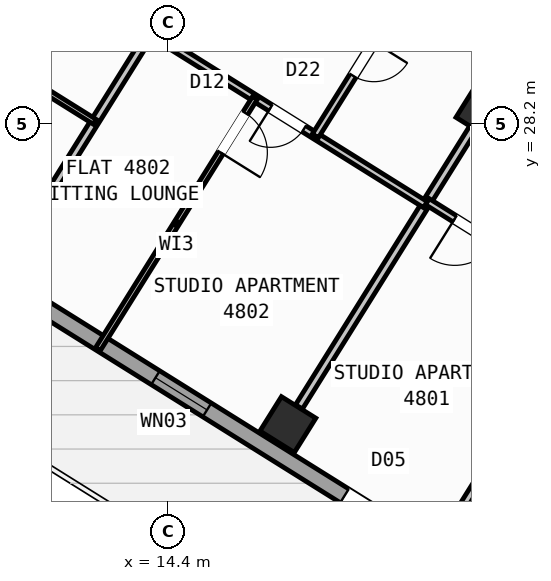
"""IFC4 building model, lengths in metres.
Left out: names, types, materials, properties, quantities, classifications, styles, units other than length and angle.
Written with IfcOpenShell. Run it as: python <this file> out.ifc"""

import sys

from ifc_helpers import new_model, si_unit, direction, frame, frame_2d, origin, origin_2d, place, context, subcontext, project, spatial, rectangle, hollow_rectangle, extrude, source, transform, mapped, element, fill, save


model = new_model("IFC4")
c1 = context("Model", 3, precision=1e-05, world=origin(), true_north=direction((0.0, 1.0)))
c2 = subcontext(c1, "Body", "Model", "MODEL_VIEW")
j1 = project(units=[si_unit("LENGTHUNIT", "METRE"), si_unit("PLANEANGLEUNIT", "RADIAN")], contexts=[c1])
p1 = place(None, origin())
s1 = spatial("IfcSite", under=j1, at=p1, CompositionType="ELEMENT")
p2 = place(p1, origin())
s2 = spatial("IfcBuilding", under=s1, at=p2, CompositionType="ELEMENT")
p3 = place(p2, frame((0.0, 0.0, 191.4)))
s3 = spatial("IfcBuildingStorey", under=s2, at=p3, CompositionType="ELEMENT", Elevation=191.4)
m1 = source(origin(), c2, "Body", "SweptSolid", [
    extrude(hollow_rectangle(XDim=0.8, YDim=0.8, WallThickness=0.032, at=origin_2d()), origin(), (0.0, 0.0, 1.0), 3.6),
])
for number, where, z_axis, x_axis in (
    (1, (20.632, 28.452, 0.0), (0.0, 0.0, 1.0), (-0.848, 0.53, 0.0)),
    (2, (16.764, 22.261, 0.0), (0.0, 0.0, 1.0), (-0.848, 0.53, 0.0)),
):
    element("IfcColumn", number, at=place(p3, frame(where, z_axis=z_axis, x_axis=x_axis)), inside=s3, PredefinedType="COLUMN", context=c2, shape_type="MappedRepresentation", body=[
        mapped(m1, transform((0.0, 0.0, 0.0), scale=1.0)),
    ])
p4 = place(p3, frame((31.76, 12.183, 0.0), z_axis=(0.0, 0.0, 1.0), x_axis=(-0.848047074256, 0.529920899612, 0.0)))
e3 = element("IfcWall", 3, at=p4, inside=s3, PredefinedType="STANDARD", context=c2, shape_type="SweptSolid", body=[
    extrude(rectangle(XDim=30.652, YDim=0.32, at=frame_2d((15.326, 0.0))), origin(), (0.0, 0.0, 1.0), 3.32),
])
p5 = place(p4, frame((15.166, 0.0, 0.0)))
e4 = element("IfcOpeningElement", 4, at=p5, cuts=e3, PredefinedType="OPENING", context=c2, shape_type="SweptSolid", body=[
    extrude(rectangle(XDim=1.2, YDim=2.15, at=frame_2d((0.6, 1.075))), frame((0.0, 0.17, 0.0), z_axis=(0.0, -1.0, 0.0), x_axis=(1.0, 0.0, 0.0)), (0.0, 0.0, 1.0), 0.34),
])
p6 = place(p4, frame((2.015, 0.0, 0.8)))
e5 = element("IfcOpeningElement", 5, at=p6, cuts=e3, PredefinedType="OPENING", context=c2, shape_type="SweptSolid", body=[
    extrude(rectangle(XDim=2.1, YDim=1.55, at=frame_2d((1.05, 0.775))), frame((0.0, 0.17, 0.0), z_axis=(0.0, -1.0, 0.0), x_axis=(1.0, 0.0, 0.0)), (0.0, 0.0, 1.0), 0.34),
])
p7 = place(p4, frame((7.244, 0.0, 0.8)))
e6 = element("IfcOpeningElement", 6, at=p7, cuts=e3, PredefinedType="OPENING", context=c2, shape_type="SweptSolid", body=[
    extrude(rectangle(XDim=2.1, YDim=1.55, at=frame_2d((1.05, 0.775))), frame((0.0, 0.17, 0.0), z_axis=(0.0, -1.0, 0.0), x_axis=(1.0, 0.0, 0.0)), (0.0, 0.0, 1.0), 0.34),
])
p8 = place(p4, frame((12.623, 0.0, 1.0)))
e7 = element("IfcOpeningElement", 7, at=p8, cuts=e3, PredefinedType="OPENING", context=c2, shape_type="SweptSolid", body=[
    extrude(rectangle(XDim=0.9, YDim=1.25, at=frame_2d((0.45, 0.625))), frame((0.0, 0.17, 0.0), z_axis=(0.0, -1.0, 0.0), x_axis=(1.0, 0.0, 0.0)), (0.0, 0.0, 1.0), 0.34),
])
p9 = place(p4, frame((19.565, 0.0, 0.95)))
e8 = element("IfcOpeningElement", 8, at=p9, cuts=e3, PredefinedType="OPENING", context=c2, shape_type="SweptSolid", body=[
    extrude(rectangle(XDim=1.2, YDim=1.4, at=frame_2d((0.6, 0.7))), frame((0.0, 0.17, 0.0), z_axis=(0.0, -1.0, 0.0), x_axis=(1.0, 0.0, 0.0)), (0.0, 0.0, 1.0), 0.34),
])
p10 = place(p4, frame((25.983, 0.0, 1.0)))
e9 = element("IfcOpeningElement", 9, at=p10, cuts=e3, PredefinedType="OPENING", context=c2, shape_type="SweptSolid", body=[
    extrude(rectangle(XDim=0.9, YDim=1.25, at=frame_2d((0.45, 0.625))), frame((0.0, 0.17, 0.0), z_axis=(0.0, -1.0, 0.0), x_axis=(1.0, 0.0, 0.0)), (0.0, 0.0, 1.0), 0.34),
])
p11 = place(p4, frame((28.433, 0.0, 1.0)))
e10 = element("IfcOpeningElement", 10, at=p11, cuts=e3, PredefinedType="OPENING", context=c2, shape_type="SweptSolid", body=[
    extrude(rectangle(XDim=0.9, YDim=1.25, at=frame_2d((0.45, 0.625))), frame((0.0, 0.17, 0.0), z_axis=(0.0, -1.0, 0.0), x_axis=(1.0, 0.0, 0.0)), (0.0, 0.0, 1.0), 0.34),
])
p12 = place(p3, frame((5.7, 28.71, 0.0), z_axis=(0.0, 0.0, 1.0), x_axis=(0.529923711467, 0.8480453172, 0.0)))
e11 = element("IfcWall", 11, at=p12, inside=s3, PredefinedType="STANDARD", context=c2, shape_type="SweptSolid", body=[
    extrude(rectangle(XDim=21.587, YDim=0.32, at=frame_2d((10.794, 0.0))), origin(), (0.0, 0.0, 1.0), 2.795),
])
p13 = place(p12, frame((1.44, 0.0, 0.95)))
e12 = element("IfcOpeningElement", 12, at=p13, cuts=e11, PredefinedType="OPENING", context=c2, shape_type="SweptSolid", body=[
    extrude(rectangle(XDim=1.2, YDim=1.4, at=frame_2d((0.6, 0.7))), frame((0.0, 0.17, 0.0), z_axis=(0.0, -1.0, 0.0), x_axis=(1.0, 0.0, 0.0)), (0.0, 0.0, 1.0), 0.34),
])
p14 = place(p12, frame((4.545, 0.0, 0.85)))
e13 = element("IfcOpeningElement", 13, at=p14, cuts=e11, PredefinedType="OPENING", context=c2, shape_type="SweptSolid", body=[
    extrude(rectangle(XDim=1.8, YDim=1.5, at=frame_2d((0.9, 0.75))), frame((0.0, 0.17, 0.0), z_axis=(0.0, -1.0, 0.0), x_axis=(1.0, 0.0, 0.0)), (0.0, 0.0, 1.0), 0.34),
])
p15 = place(p12, frame((12.139, 0.0, 1.0)))
e14 = element("IfcOpeningElement", 14, at=p15, cuts=e11, PredefinedType="OPENING", context=c2, shape_type="SweptSolid", body=[
    extrude(rectangle(XDim=0.9, YDim=1.25, at=frame_2d((0.45, 0.625))), frame((0.0, 0.17, 0.0), z_axis=(0.0, -1.0, 0.0), x_axis=(1.0, 0.0, 0.0)), (0.0, 0.0, 1.0), 0.34),
])
p16 = place(p12, frame((16.35, 0.0, 0.95)))
e15 = element("IfcOpeningElement", 15, at=p16, cuts=e11, PredefinedType="OPENING", context=c2, shape_type="SweptSolid", body=[
    extrude(rectangle(XDim=1.2, YDim=1.4, at=frame_2d((0.6, 0.7))), frame((0.0, 0.17, 0.0), z_axis=(0.0, -1.0, 0.0), x_axis=(1.0, 0.0, 0.0)), (0.0, 0.0, 1.0), 0.34),
])
p17 = place(p12, frame((18.762, 0.0, 0.95)))
e16 = element("IfcOpeningElement", 16, at=p17, cuts=e11, PredefinedType="OPENING", context=c2, shape_type="SweptSolid", body=[
    extrude(rectangle(XDim=1.2, YDim=1.4, at=frame_2d((0.6, 0.7))), frame((0.0, 0.17, 0.0), z_axis=(0.0, -1.0, 0.0), x_axis=(1.0, 0.0, 0.0)), (0.0, 0.0, 1.0), 0.34),
])
p18 = place(p3, frame((24.588, 27.631, 0.0), z_axis=(0.0, 0.0, 1.0), x_axis=(-0.529914992377, -0.848050765494, 0.0)))
e17 = element("IfcWall", 17, at=p18, inside=s3, PredefinedType="PARTITIONING", context=c2, shape_type="SweptSolid", body=[
    extrude(rectangle(XDim=9.15, YDim=0.16, at=frame_2d((4.575, 0.0))), origin(), (0.0, 0.0, 1.0), 3.31),
])
p19 = place(p3, frame((25.754, 29.497, 0.0), z_axis=(0.0, 0.0, 1.0), x_axis=(-0.848045850158, 0.529922858565, 0.0)))
e18 = element("IfcWall", 18, at=p19, inside=s3, PredefinedType="PARTITIONING", context=c2, shape_type="SweptSolid", body=[
    extrude(rectangle(XDim=16.73, YDim=0.16, at=frame_2d((8.365, 0.0))), origin(), (0.0, 0.0, 1.0), 3.31),
])
p20 = place(p19, frame((2.22, 0.0, 0.0)))
e19 = element("IfcOpeningElement", 19, at=p20, cuts=e18, PredefinedType="OPENING", context=c2, shape_type="SweptSolid", body=[
    extrude(rectangle(XDim=0.86, YDim=2.05, at=frame_2d((0.43, 1.025))), frame((0.0, 0.09, 0.0), z_axis=(0.0, -1.0, 0.0), x_axis=(1.0, 0.0, 0.0)), (0.0, 0.0, 1.0), 0.18),
])
p21 = place(p19, frame((6.49, 0.0, 0.0)))
e20 = element("IfcOpeningElement", 20, at=p21, cuts=e18, PredefinedType="OPENING", context=c2, shape_type="SweptSolid", body=[
    extrude(rectangle(XDim=1.0, YDim=2.1, at=frame_2d((0.5, 1.05))), frame((0.0, 0.09, 0.0), z_axis=(0.0, -1.0, 0.0), x_axis=(1.0, 0.0, 0.0)), (0.0, 0.0, 1.0), 0.18),
])
p22 = place(p19, frame((14.304, 0.0, 0.0)))
e21 = element("IfcOpeningElement", 21, at=p22, cuts=e18, PredefinedType="OPENING", context=c2, shape_type="SweptSolid", body=[
    extrude(rectangle(XDim=1.0, YDim=2.1, at=frame_2d((0.5, 1.05))), frame((0.0, 0.09, 0.0), z_axis=(0.0, -1.0, 0.0), x_axis=(1.0, 0.0, 0.0)), (0.0, 0.0, 1.0), 0.18),
])
p23 = place(p3, frame((24.588, 27.631, 0.0), z_axis=(0.0, 0.0, 1.0), x_axis=(-0.848041752158, 0.529929416617, 0.0)))
e22 = element("IfcWall", 22, at=p23, inside=s3, PredefinedType="PARTITIONING", context=c2, shape_type="SweptSolid", body=[
    extrude(rectangle(XDim=16.73, YDim=0.16, at=frame_2d((8.365, 0.0))), origin(), (0.0, 0.0, 1.0), 3.31),
])
p24 = place(p23, frame((2.22, 0.0, 0.0)))
e23 = element("IfcOpeningElement", 23, at=p24, cuts=e22, PredefinedType="OPENING", context=c2, shape_type="SweptSolid", body=[
    extrude(rectangle(XDim=0.86, YDim=2.05, at=frame_2d((0.43, 1.025))), frame((0.0, 0.09, 0.0), z_axis=(0.0, -1.0, 0.0), x_axis=(1.0, 0.0, 0.0)), (0.0, 0.0, 1.0), 0.18),
])
p25 = place(p23, frame((7.82, 0.0, 0.0)))
e24 = element("IfcOpeningElement", 24, at=p25, cuts=e22, PredefinedType="OPENING", context=c2, shape_type="SweptSolid", body=[
    extrude(rectangle(XDim=1.0, YDim=2.1, at=frame_2d((0.5, 1.05))), frame((0.0, 0.09, 0.0), z_axis=(0.0, -1.0, 0.0), x_axis=(1.0, 0.0, 0.0)), (0.0, 0.0, 1.0), 0.18),
])
p26 = place(p23, frame((12.95, 0.0, 0.0)))
e25 = element("IfcOpeningElement", 25, at=p26, cuts=e22, PredefinedType="OPENING", context=c2, shape_type="SweptSolid", body=[
    extrude(rectangle(XDim=1.0, YDim=2.1, at=frame_2d((0.5, 1.05))), frame((0.0, 0.09, 0.0), z_axis=(0.0, -1.0, 0.0), x_axis=(1.0, 0.0, 0.0)), (0.0, 0.0, 1.0), 0.18),
])
p27 = place(p3, frame((20.414, 28.103, 0.0), z_axis=(0.0, 0.0, 1.0), x_axis=(-0.529934553702, -0.848038542045, 0.0)))
e26 = element("IfcWall", 26, at=p27, inside=s3, PredefinedType="PARTITIONING", context=c2, shape_type="SweptSolid", body=[
    extrude(rectangle(XDim=6.476, YDim=0.16, at=frame_2d((3.238, 0.0))), origin(), (0.0, 0.0, 1.0), 2.795),
])
p28 = place(p3, frame((22.728, 24.654, 0.0), z_axis=(0.0, 0.0, 1.0), x_axis=(-0.848059820872, 0.529900500304, 0.0)))
e27 = element("IfcWall", 27, at=p28, inside=s3, PredefinedType="PLUMBINGWALL", context=c2, shape_type="SweptSolid", body=[
    extrude(rectangle(XDim=3.79, YDim=0.14, at=frame_2d((1.895, 0.0))), origin(), (0.0, 0.0, 1.0), 3.31),
])
p29 = place(p28, frame((2.23, 0.0, 0.0)))
e28 = element("IfcOpeningElement", 28, at=p29, cuts=e27, PredefinedType="OPENING", context=c2, shape_type="SweptSolid", body=[
    extrude(rectangle(XDim=0.92, YDim=2.08, at=frame_2d((0.46, 1.04))), frame((0.0, 0.08, 0.0), z_axis=(0.0, -1.0, 0.0), x_axis=(1.0, 0.0, 0.0)), (0.0, 0.0, 1.0), 0.16),
])
p30 = place(p3, frame((14.986, 31.494, 0.0), z_axis=(0.0, 0.0, 1.0), x_axis=(-0.529907440938, -0.848055484057, 0.0)))
e29 = element("IfcWall", 29, at=p30, inside=s3, PredefinedType="PARTITIONING", context=c2, shape_type="SweptSolid", body=[
    extrude(rectangle(XDim=6.476, YDim=0.16, at=frame_2d((3.238, 0.0))), origin(), (0.0, 0.0, 1.0), 2.795),
])
p31 = place(p3, frame((19.477, 26.603, 0.0), z_axis=(0.0, 0.0, 1.0), x_axis=(-0.848039019877, 0.529933789039, 0.0)))
e30 = element("IfcWall", 30, at=p31, inside=s3, PredefinedType="PLUMBINGWALL", context=c2, shape_type="SweptSolid", body=[
    extrude(rectangle(XDim=6.4, YDim=0.14, at=frame_2d((3.2, 0.0))), origin(), (0.0, 0.0, 1.0), 3.31),
])
p32 = place(p31, frame((2.824, 0.0, 0.0)))
e31 = element("IfcOpeningElement", 31, at=p32, cuts=e30, PredefinedType="OPENING", context=c2, shape_type="SweptSolid", body=[
    extrude(rectangle(XDim=0.78, YDim=2.05, at=frame_2d((0.39, 1.025))), frame((0.0, 0.08, 0.0), z_axis=(0.0, -1.0, 0.0), x_axis=(1.0, 0.0, 0.0)), (0.0, 0.0, 1.0), 0.16),
])
p33 = place(p3, frame((19.203, 30.996, 0.0), z_axis=(0.0, 0.0, 1.0), x_axis=(-0.529906983049, -0.848055770169, 0.0)))
e32 = element("IfcWall", 32, at=p33, inside=s3, PredefinedType="PLUMBINGWALL", context=c2, shape_type="SweptSolid", body=[
    extrude(rectangle(XDim=3.58, YDim=0.14, at=frame_2d((1.79, 0.0))), origin(), (0.0, 0.0, 1.0), 3.31),
])
p34 = place(p33, frame((1.4, 0.0, 0.0)))
e33 = element("IfcOpeningElement", 33, at=p34, cuts=e32, PredefinedType="OPENING", context=c2, shape_type="SweptSolid", body=[
    extrude(rectangle(XDim=0.78, YDim=2.05, at=frame_2d((0.39, 1.025))), frame((0.0, 0.08, 0.0), z_axis=(0.0, -1.0, 0.0), x_axis=(1.0, 0.0, 0.0)), (0.0, 0.0, 1.0), 0.16),
])
p35 = place(p3, frame((16.112, 28.706, 0.0), z_axis=(0.0, 0.0, 1.0), x_axis=(-0.529916267533, -0.848049968695, 0.0)))
e34 = element("IfcWall", 34, at=p35, inside=s3, PredefinedType="PARTITIONING", context=c2, shape_type="SweptSolid", body=[
    extrude(rectangle(XDim=5.84, YDim=0.11, at=frame_2d((2.92, 0.0))), origin(), (0.0, 0.0, 1.0), 3.31),
])
p36 = place(p35, frame((0.35, 0.0, 0.0)))
e35 = element("IfcOpeningElement", 35, at=p36, cuts=e34, PredefinedType="OPENING", context=c2, shape_type="SweptSolid", body=[
    extrude(rectangle(XDim=0.92, YDim=2.08, at=frame_2d((0.46, 1.04))), frame((0.0, 0.065, 0.0), z_axis=(0.0, -1.0, 0.0), x_axis=(1.0, 0.0, 0.0)), (0.0, 0.0, 1.0), 0.13),
])
p37 = place(p3, frame((12.951, 28.238, 0.0), z_axis=(0.0, 0.0, 1.0), x_axis=(-0.848031959833, 0.529945086874, 0.0)))
e36 = element("IfcWall", 36, at=p37, inside=s3, PredefinedType="PARTITIONING", context=c2, shape_type="SweptSolid", body=[
    extrude(rectangle(XDim=6.52, YDim=0.11, at=frame_2d((3.26, 0.0))), origin(), (0.0, 0.0, 1.0), 3.31),
])
p38 = place(p37, frame((2.8, 0.0, 0.0)))
e37 = element("IfcOpeningElement", 37, at=p38, cuts=e36, PredefinedType="OPENING", context=c2, shape_type="SweptSolid", body=[
    extrude(rectangle(XDim=0.92, YDim=2.08, at=frame_2d((0.46, 1.04))), frame((0.0, 0.065, 0.0), z_axis=(0.0, -1.0, 0.0), x_axis=(1.0, 0.0, 0.0)), (0.0, 0.0, 1.0), 0.13),
])
m2 = source(origin(), c2, "Body", "SweptSolid", [
    extrude(rectangle(XDim=1.2, YDim=2.15, at=frame_2d((0.6, 1.075))), frame((0.0, 0.025, 0.0), z_axis=(0.0, -1.0, 0.0), x_axis=(1.0, 0.0, 0.0)), (0.0, 0.0, 1.0), 0.05),
])
p39 = place(p5, origin())
e38 = element("IfcDoor", 38, at=p39, inside=s3, OperationType="SINGLE_SWING_LEFT", PredefinedType="DOOR", context=c2, shape_type="MappedRepresentation", body=[
    mapped(m2, transform((0.0, 0.0, 0.0), scale=1.0)),
])
fill(e4, e38)
m3 = source(origin(), c2, "Body", "SweptSolid", [
    extrude(rectangle(XDim=1.2, YDim=1.4, at=frame_2d((0.6, 0.7))), frame((0.0, 0.03, 0.0), z_axis=(0.0, -1.0, 0.0), x_axis=(1.0, 0.0, 0.0)), (0.0, 0.0, 1.0), 0.06),
])
p40 = place(p9, origin())
e39 = element("IfcWindow", 39, at=p40, inside=s3, PartitioningType="SINGLE_PANEL", PredefinedType="WINDOW", context=c2, shape_type="MappedRepresentation", body=[
    mapped(m3, transform((0.0, 0.0, 0.0), scale=1.0)),
])
fill(e8, e39)
m4 = source(origin(), c2, "Body", "SweptSolid", [
    extrude(rectangle(XDim=0.92, YDim=2.08, at=frame_2d((0.46, 1.04))), frame((0.0, 0.025, 0.0), z_axis=(0.0, -1.0, 0.0), x_axis=(1.0, 0.0, 0.0)), (0.0, 0.0, 1.0), 0.05),
])
p41 = place(p29, origin())
e40 = element("IfcDoor", 40, at=p41, inside=s3, OperationType="SINGLE_SWING_RIGHT", PredefinedType="DOOR", context=c2, shape_type="MappedRepresentation", body=[
    mapped(m4, transform((0.0, 0.0, 0.0), scale=1.0)),
])
fill(e28, e40)
p42 = place(p36, origin())
e41 = element("IfcDoor", 41, at=p42, inside=s3, OperationType="SINGLE_SWING_RIGHT", PredefinedType="DOOR", context=c2, shape_type="MappedRepresentation", body=[
    mapped(m4, transform((0.0, 0.0, 0.0), scale=1.0)),
])
fill(e35, e41)
m5 = source(origin(), c2, "Body", "SweptSolid", [
    extrude(rectangle(XDim=0.78, YDim=2.05, at=frame_2d((0.39, 1.025))), frame((0.0, 0.025, 0.0), z_axis=(0.0, -1.0, 0.0), x_axis=(1.0, 0.0, 0.0)), (0.0, 0.0, 1.0), 0.05),
])
p43 = place(p32, origin())
e42 = element("IfcDoor", 42, at=p43, inside=s3, OperationType="SINGLE_SWING_RIGHT", PredefinedType="DOOR", context=c2, shape_type="MappedRepresentation", body=[
    mapped(m5, transform((0.0, 0.0, 0.0), scale=1.0)),
])
fill(e31, e42)
p44 = place(p34, origin())
e43 = element("IfcDoor", 43, at=p44, inside=s3, OperationType="SINGLE_SWING_LEFT", PredefinedType="DOOR", context=c2, shape_type="MappedRepresentation", body=[
    mapped(m5, transform((0.0, 0.0, 0.0), scale=1.0)),
])
fill(e33, e43)
save(model, sys.argv[1])
